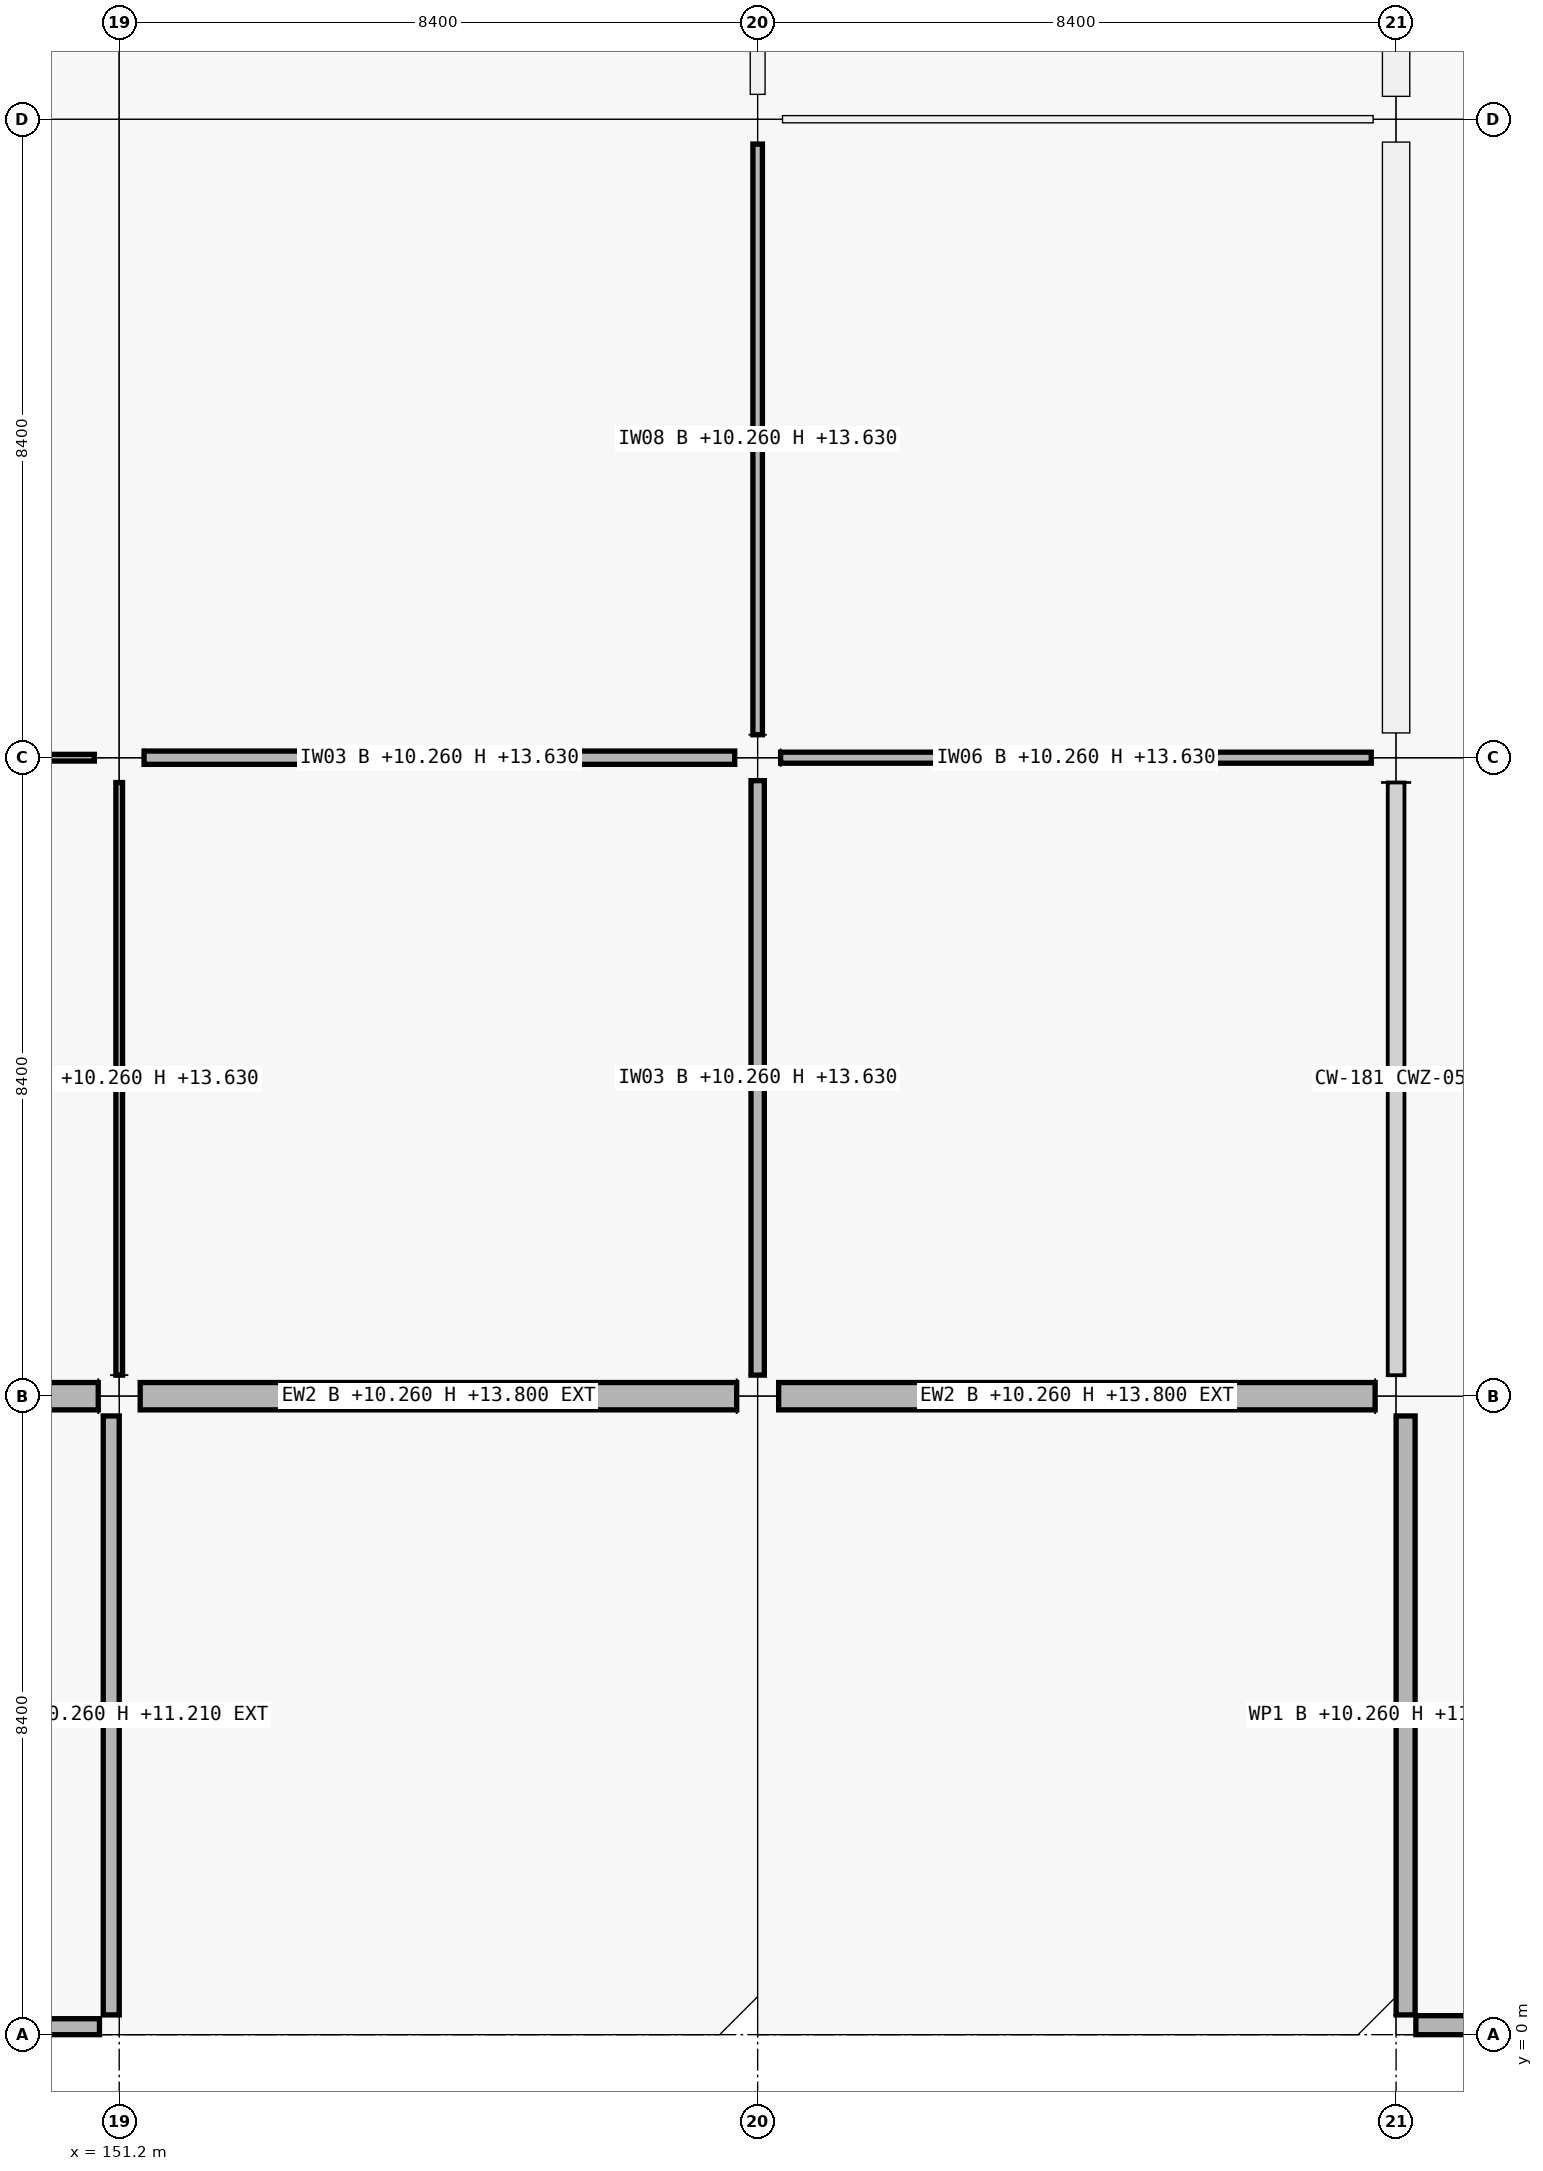
"""IFC4 building model, lengths in metres.
Left out: names, types, materials, properties, quantities, classifications, styles, units other than length and angle.
Written with IfcOpenShell. Run it as: python <this file> out.ifc"""

import sys

from ifc_helpers import new_model, si_unit, direction, frame, frame_2d, origin, origin_2d, place, context, subcontext, project, spatial, rectangle, extrude, element, fill, save


model = new_model("IFC4")
c1 = context("Model", 3, precision=1e-05, world=origin(), true_north=direction((0.0, 1.0)))
c2 = subcontext(c1, "Body", "Model", "MODEL_VIEW")
j1 = project(units=[si_unit("LENGTHUNIT", "METRE"), si_unit("PLANEANGLEUNIT", "RADIAN")], contexts=[c1])
p1 = place(None, origin())
s1 = spatial("IfcSite", under=j1, at=p1, CompositionType="ELEMENT")
p2 = place(p1, origin())
s2 = spatial("IfcBuilding", under=s1, at=p2, CompositionType="ELEMENT")
p3 = place(p2, frame((0.0, 0.0, 10.26)))
s3 = spatial("IfcBuildingStorey", under=s2, at=p3, CompositionType="ELEMENT", Elevation=10.26)
p4 = place(p3, frame((151.2, 8.4, 0.0), z_axis=(0.0, 0.0, 1.0), x_axis=(1.0, 0.0, 0.0)))
e1 = element("IfcColumn", 1, at=p4, inside=s3, PredefinedType="COLUMN", context=c2, shape_type="SweptSolid", body=[
    extrude(rectangle(XDim=0.55, YDim=0.55, at=origin_2d()), origin(), (0.0, 0.0, 1.0), 4.25),
])
p5 = place(p3, frame((151.2, 16.8, 0.0), z_axis=(0.0, 0.0, 1.0), x_axis=(1.0, 0.0, 0.0)))
e2 = element("IfcColumn", 2, at=p5, inside=s3, PredefinedType="COLUMN", context=c2, shape_type="SweptSolid", body=[
    extrude(rectangle(XDim=0.65, YDim=0.65, at=origin_2d()), origin(), (0.0, 0.0, 1.0), 4.5),
])
p6 = place(p3, frame((151.2, 25.2, 0.0), z_axis=(0.0, 0.0, 1.0), x_axis=(1.0, 0.0, 0.0)))
e3 = element("IfcColumn", 3, at=p6, inside=s3, PredefinedType="COLUMN", context=c2, shape_type="SweptSolid", body=[
    extrude(rectangle(XDim=0.6, YDim=0.6, at=origin_2d()), origin(), (0.0, 0.0, 1.0), 4.5),
])
p7 = place(p3, frame((159.6, 8.4, 0.0), z_axis=(0.0, 0.0, 1.0), x_axis=(1.0, 0.0, 0.0)))
e4 = element("IfcColumn", 4, at=p7, inside=s3, PredefinedType="COLUMN", context=c2, shape_type="SweptSolid", body=[
    extrude(rectangle(XDim=0.55, YDim=0.55, at=origin_2d()), origin(), (0.0, 0.0, 1.0), 4.25),
])
p8 = place(p3, frame((159.6, 16.8, 0.0), z_axis=(0.0, 0.0, 1.0), x_axis=(1.0, 0.0, 0.0)))
e5 = element("IfcColumn", 5, at=p8, inside=s3, PredefinedType="COLUMN", context=c2, shape_type="SweptSolid", body=[
    extrude(rectangle(XDim=0.6, YDim=0.6, at=origin_2d()), origin(), (0.0, 0.0, 1.0), 4.5),
])
p9 = place(p3, frame((159.6, 25.2, 0.0), z_axis=(0.0, 0.0, 1.0), x_axis=(1.0, 0.0, 0.0)))
e6 = element("IfcColumn", 6, at=p9, inside=s3, PredefinedType="COLUMN", context=c2, shape_type="SweptSolid", body=[
    extrude(rectangle(XDim=0.65, YDim=0.65, at=origin_2d()), origin(), (0.0, 0.0, 1.0), 4.5),
])
p10 = place(p3, frame((168.0, 8.4, 0.0), z_axis=(0.0, 0.0, 1.0), x_axis=(1.0, 0.0, 0.0)))
e7 = element("IfcColumn", 7, at=p10, inside=s3, PredefinedType="COLUMN", context=c2, shape_type="SweptSolid", body=[
    extrude(rectangle(XDim=0.55, YDim=0.55, at=origin_2d()), origin(), (0.0, 0.0, 1.0), 4.25),
])
p11 = place(p3, frame((168.0, 16.8, 0.0), z_axis=(0.0, 0.0, 1.0), x_axis=(1.0, 0.0, 0.0)))
e8 = element("IfcColumn", 8, at=p11, inside=s3, PredefinedType="COLUMN", context=c2, shape_type="SweptSolid", body=[
    extrude(rectangle(XDim=0.65, YDim=0.65, at=origin_2d()), origin(), (0.0, 0.0, 1.0), 4.5),
])
p12 = place(p3, frame((168.0, 25.2, 0.0), z_axis=(0.0, 0.0, 1.0), x_axis=(1.0, 0.0, 0.0)))
e9 = element("IfcColumn", 9, at=p12, inside=s3, PredefinedType="COLUMN", context=c2, shape_type="SweptSolid", body=[
    extrude(rectangle(XDim=0.6, YDim=0.6, at=origin_2d()), origin(), (0.0, 0.0, 1.0), 4.5),
])
p13 = place(p3, frame((150.924, 8.4, 0.0), z_axis=(0.0, 0.0, 1.0), x_axis=(-1.0, 0.0, 0.0)))
e10 = element("IfcWall", 10, at=p13, inside=s3, PredefinedType="SOLIDWALL", context=c2, shape_type="SweptSolid", body=[
    extrude(rectangle(XDim=7.848, YDim=0.36, at=frame_2d((3.924, 0.0))), origin(), (0.0, 0.0, 1.0), 3.54),
])
p14 = place(p13, frame((2.899, 0.0, 0.9)))
e11 = element("IfcOpeningElement", 11, at=p14, cuts=e10, PredefinedType="OPENING", context=c2, shape_type="SweptSolid", body=[
    extrude(rectangle(XDim=2.05, YDim=1.45, at=frame_2d((1.025, 0.725))), frame((0.0, 0.18, 0.0), z_axis=(0.0, -1.0, 0.0), x_axis=(1.0, 0.0, 0.0)), (0.0, 0.0, 1.0), 0.36),
])
p15 = place(p3, frame((159.324, 8.4, 0.0), z_axis=(0.0, 0.0, 1.0), x_axis=(-1.0, 0.0, 0.0)))
e12 = element("IfcWall", 12, at=p15, inside=s3, PredefinedType="SOLIDWALL", context=c2, shape_type="SweptSolid", body=[
    extrude(rectangle(XDim=7.848, YDim=0.36, at=frame_2d((3.924, 0.0))), origin(), (0.0, 0.0, 1.0), 3.54),
])
p16 = place(p15, frame((2.999, 0.0, 0.0)))
e13 = element("IfcOpeningElement", 13, at=p16, cuts=e12, PredefinedType="OPENING", context=c2, shape_type="SweptSolid", body=[
    extrude(rectangle(XDim=1.85, YDim=2.2, at=frame_2d((0.925, 1.1))), frame((0.0, 0.18, 0.0), z_axis=(0.0, -1.0, 0.0), x_axis=(1.0, 0.0, 0.0)), (0.0, 0.0, 1.0), 0.36),
])
p17 = place(p3, frame((167.724, 8.4, 0.0), z_axis=(0.0, 0.0, 1.0), x_axis=(-1.0, 0.0, 0.0)))
e14 = element("IfcWall", 14, at=p17, inside=s3, PredefinedType="SOLIDWALL", context=c2, shape_type="SweptSolid", body=[
    extrude(rectangle(XDim=7.848, YDim=0.36, at=frame_2d((3.924, 0.0))), origin(), (0.0, 0.0, 1.0), 3.54),
])
p18 = place(p17, frame((3.364, 0.0, 0.0)))
e15 = element("IfcOpeningElement", 15, at=p18, cuts=e14, PredefinedType="OPENING", context=c2, shape_type="SweptSolid", body=[
    extrude(rectangle(XDim=1.12, YDim=2.2, at=frame_2d((0.56, 1.1))), frame((0.0, 0.18, 0.0), z_axis=(0.0, -1.0, 0.0), x_axis=(1.0, 0.0, 0.0)), (0.0, 0.0, 1.0), 0.36),
])
p19 = place(p3, frame((168.0, 24.899, 0.0), z_axis=(0.0, 0.0, 1.0), x_axis=(0.0, -1.0, 0.0)))
e16 = element("IfcWall", 16, at=p19, inside=s3, PredefinedType="SOLIDWALL", context=c2, shape_type="SweptSolid", body=[
    extrude(rectangle(XDim=7.773, YDim=0.36, at=frame_2d((3.886, 0.0))), origin(), (0.0, 0.0, 1.0), 3.54),
])
p20 = place(p19, frame((3.087, 0.0, 0.9)))
e17 = element("IfcOpeningElement", 17, at=p20, cuts=e16, PredefinedType="OPENING", context=c2, shape_type="SweptSolid", body=[
    extrude(rectangle(XDim=1.6, YDim=2.1, at=frame_2d((0.8, 1.05))), frame((0.0, 0.18, 0.0), z_axis=(0.0, -1.0, 0.0), x_axis=(1.0, 0.0, 0.0)), (0.0, 0.0, 1.0), 0.36),
])
p21 = place(p3, frame((168.0, 33.274, 0.0), z_axis=(0.0, 0.0, 1.0), x_axis=(0.0, -1.0, 0.0)))
e18 = element("IfcWall", 18, at=p21, inside=s3, PredefinedType="SOLIDWALL", context=c2, shape_type="SweptSolid", body=[
    extrude(rectangle(XDim=7.773, YDim=0.36, at=frame_2d((3.886, 0.0))), origin(), (0.0, 0.0, 1.0), 3.54),
])
p22 = place(p21, frame((2.886, 0.0, 0.9)))
e19 = element("IfcOpeningElement", 19, at=p22, cuts=e18, PredefinedType="OPENING", context=c2, shape_type="SweptSolid", body=[
    extrude(rectangle(XDim=2.0, YDim=2.1, at=frame_2d((1.0, 1.05))), frame((0.0, 0.18, 0.0), z_axis=(0.0, -1.0, 0.0), x_axis=(1.0, 0.0, 0.0)), (0.0, 0.0, 1.0), 0.36),
])
for number, where, z_axis, x_axis in (
    (20, (150.94, 0.105, 0.0), (0.0, 0.0, 1.0), (-1.0, 0.0, 0.0)),
    (21, (151.095, 8.14, 0.0), (0.0, 0.0, 1.0), (0.0, -1.0, 0.0)),
):
    element("IfcWall", number, at=place(p3, frame(where, z_axis=z_axis, x_axis=x_axis)), inside=s3, PredefinedType="PARAPET", context=c2, shape_type="SweptSolid", body=[
        extrude(rectangle(XDim=7.88, YDim=0.21, at=frame_2d((3.94, 0.0))), origin(), (0.0, 0.0, 1.0), 0.95),
    ])
for number, where, z_axis, x_axis in (
    (22, (176.14, 0.125, 0.0), (0.0, 0.0, 1.0), (-1.0, 0.0, 0.0)),
    (23, (168.125, 0.26, 0.0), (0.0, 0.0, 1.0), (0.0, 1.0, 0.0)),
):
    element("IfcWall", number, at=place(p3, frame(where, z_axis=z_axis, x_axis=x_axis)), inside=s3, PredefinedType="PARAPET", context=c2, shape_type="SweptSolid", body=[
        extrude(rectangle(XDim=7.88, YDim=0.25, at=frame_2d((3.94, 0.0))), origin(), (0.0, 0.0, 1.0), 0.95),
    ])
p23 = place(p3, frame((143.102, 16.8, 0.0), z_axis=(0.0, 0.0, 1.0), x_axis=(1.0, 0.0, 0.0)))
e24 = element("IfcWall", 24, at=p23, inside=s3, PredefinedType="PARTITIONING", context=c2, shape_type="SweptSolid", body=[
    extrude(rectangle(XDim=7.771, YDim=0.088, at=frame_2d((3.885, 0.0))), origin(), (0.0, 0.0, 1.0), 3.37),
])
p24 = place(p23, frame((3.385, 0.0, 0.0)))
e25 = element("IfcOpeningElement", 25, at=p24, cuts=e24, PredefinedType="OPENING", context=c2, shape_type="SweptSolid", body=[
    extrude(rectangle(XDim=1.0, YDim=2.2, at=frame_2d((0.5, 1.1))), frame((0.0, 0.044, 0.0), z_axis=(0.0, -1.0, 0.0), x_axis=(1.0, 0.0, 0.0)), (0.0, 0.0, 1.0), 0.088),
])
p25 = place(p3, frame((151.527, 16.8, 0.0), z_axis=(0.0, 0.0, 1.0), x_axis=(1.0, 0.0, 0.0)))
e26 = element("IfcWall", 26, at=p25, inside=s3, PredefinedType="PARTITIONING", context=c2, shape_type="SweptSolid", body=[
    extrude(rectangle(XDim=7.771, YDim=0.175, at=frame_2d((3.885, 0.0))), origin(), (0.0, 0.0, 1.0), 3.37),
])
p26 = place(p25, frame((3.396, 0.0, 0.0)))
e27 = element("IfcOpeningElement", 27, at=p26, cuts=e26, PredefinedType="OPENING", context=c2, shape_type="SweptSolid", body=[
    extrude(rectangle(XDim=0.98, YDim=2.18, at=frame_2d((0.49, 1.09))), frame((0.0, 0.087, 0.0), z_axis=(0.0, -1.0, 0.0), x_axis=(1.0, 0.0, 0.0)), (0.0, 0.0, 1.0), 0.175),
])
p27 = place(p3, frame((159.902, 16.8, 0.0), z_axis=(0.0, 0.0, 1.0), x_axis=(1.0, 0.0, 0.0)))
e28 = element("IfcWall", 28, at=p27, inside=s3, PredefinedType="PARTITIONING", context=c2, shape_type="SweptSolid", body=[
    extrude(rectangle(XDim=7.771, YDim=0.145, at=frame_2d((3.885, 0.0))), origin(), (0.0, 0.0, 1.0), 3.37),
])
p28 = place(p27, frame((3.425, 0.0, 0.0)))
e29 = element("IfcOpeningElement", 29, at=p28, cuts=e28, PredefinedType="OPENING", context=c2, shape_type="SweptSolid", body=[
    extrude(rectangle(XDim=0.92, YDim=2.15, at=frame_2d((0.46, 1.075))), frame((0.0, 0.073, 0.0), z_axis=(0.0, -1.0, 0.0), x_axis=(1.0, 0.0, 0.0)), (0.0, 0.0, 1.0), 0.145),
])
p29 = place(p3, frame((159.927, 25.2, 0.0), z_axis=(0.0, 0.0, 1.0), x_axis=(1.0, 0.0, 0.0)))
e30 = element("IfcWall", 30, at=p29, inside=s3, PredefinedType="PARTITIONING", context=c2, shape_type="SweptSolid", body=[
    extrude(rectangle(XDim=7.771, YDim=0.095, at=frame_2d((3.885, 0.0))), origin(), (0.0, 0.0, 1.0), 3.37),
])
p30 = place(p29, frame((3.401, 0.0, 0.0)))
e31 = element("IfcOpeningElement", 31, at=p30, cuts=e30, PredefinedType="OPENING", context=c2, shape_type="SweptSolid", body=[
    extrude(rectangle(XDim=0.97, YDim=2.12, at=frame_2d((0.485, 1.06))), frame((0.0, 0.047, 0.0), z_axis=(0.0, -1.0, 0.0), x_axis=(1.0, 0.0, 0.0)), (0.0, 0.0, 1.0), 0.095),
])
p31 = place(p3, frame((151.2, 8.677, 0.0), z_axis=(0.0, 0.0, 1.0), x_axis=(0.0, 1.0, 0.0)))
e32 = element("IfcWall", 32, at=p31, inside=s3, PredefinedType="PARTITIONING", context=c2, shape_type="SweptSolid", body=[
    extrude(rectangle(XDim=7.796, YDim=0.088, at=frame_2d((3.898, 0.0))), origin(), (0.0, 0.0, 1.0), 3.37),
])
p32 = place(p31, frame((3.393, 0.0, 0.0)))
e33 = element("IfcOpeningElement", 33, at=p32, cuts=e32, PredefinedType="OPENING", context=c2, shape_type="SweptSolid", body=[
    extrude(rectangle(XDim=1.01, YDim=2.12, at=frame_2d((0.505, 1.06))), frame((0.0, 0.044, 0.0), z_axis=(0.0, -1.0, 0.0), x_axis=(1.0, 0.0, 0.0)), (0.0, 0.0, 1.0), 0.088),
])
p33 = place(p3, frame((159.6, 8.677, 0.0), z_axis=(0.0, 0.0, 1.0), x_axis=(0.0, 1.0, 0.0)))
e34 = element("IfcWall", 34, at=p33, inside=s3, PredefinedType="PARTITIONING", context=c2, shape_type="SweptSolid", body=[
    extrude(rectangle(XDim=7.821, YDim=0.175, at=frame_2d((3.911, 0.0))), origin(), (0.0, 0.0, 1.0), 3.37),
])
p34 = place(p33, frame((3.37, 0.0, 0.0)))
e35 = element("IfcOpeningElement", 35, at=p34, cuts=e34, PredefinedType="OPENING", context=c2, shape_type="SweptSolid", body=[
    extrude(rectangle(XDim=1.08, YDim=2.25, at=frame_2d((0.54, 1.125))), frame((0.0, 0.087, 0.0), z_axis=(0.0, -1.0, 0.0), x_axis=(1.0, 0.0, 0.0)), (0.0, 0.0, 1.0), 0.175),
])
p35 = place(p3, frame((159.6, 17.102, 0.0), z_axis=(0.0, 0.0, 1.0), x_axis=(0.0, 1.0, 0.0)))
e36 = element("IfcWall", 36, at=p35, inside=s3, PredefinedType="PARTITIONING", context=c2, shape_type="SweptSolid", body=[
    extrude(rectangle(XDim=7.771, YDim=0.125, at=frame_2d((3.885, 0.0))), origin(), (0.0, 0.0, 1.0), 3.37),
])
p36 = place(p35, frame((3.356, 0.0, 0.0)))
e37 = element("IfcOpeningElement", 37, at=p36, cuts=e36, PredefinedType="OPENING", context=c2, shape_type="SweptSolid", body=[
    extrude(rectangle(XDim=1.06, YDim=2.25, at=frame_2d((0.53, 1.125))), frame((0.0, 0.062, 0.0), z_axis=(0.0, -1.0, 0.0), x_axis=(1.0, 0.0, 0.0)), (0.0, 0.0, 1.0), 0.125),
])
p37 = place(p3, frame((159.6, 25.527, 0.0), z_axis=(0.0, 0.0, 1.0), x_axis=(0.0, 1.0, 0.0)))
e38 = element("IfcWall", 38, at=p37, inside=s3, PredefinedType="PARTITIONING", context=c2, shape_type="SweptSolid", body=[
    extrude(rectangle(XDim=7.771, YDim=0.195, at=frame_2d((3.885, 0.0))), origin(), (0.0, 0.0, 1.0), 3.37),
])
p38 = place(p37, frame((3.361, 0.0, 0.0)))
e39 = element("IfcOpeningElement", 39, at=p38, cuts=e38, PredefinedType="OPENING", context=c2, shape_type="SweptSolid", body=[
    extrude(rectangle(XDim=1.05, YDim=2.12, at=frame_2d((0.525, 1.06))), frame((0.0, 0.098, 0.0), z_axis=(0.0, -1.0, 0.0), x_axis=(1.0, 0.0, 0.0)), (0.0, 0.0, 1.0), 0.195),
])
p39 = place(p16, origin())
e40 = element("IfcDoor", 40, at=p39, inside=s3, OperationType="DOUBLE_DOOR_SINGLE_SWING", PredefinedType="DOOR", context=c2, shape_type="SweptSolid", body=[
    extrude(rectangle(XDim=1.85, YDim=2.2, at=frame_2d((0.925, 1.1))), frame((0.0, 0.025, 0.0), z_axis=(0.0, -1.0, 0.0), x_axis=(1.0, 0.0, 0.0)), (0.0, 0.0, 1.0), 0.05),
])
fill(e13, e40)
p40 = place(p18, origin())
e41 = element("IfcDoor", 41, at=p40, inside=s3, OperationType="SINGLE_SWING_LEFT", PredefinedType="DOOR", context=c2, shape_type="SweptSolid", body=[
    extrude(rectangle(XDim=1.12, YDim=2.2, at=frame_2d((0.56, 1.1))), frame((0.0, 0.025, 0.0), z_axis=(0.0, -1.0, 0.0), x_axis=(1.0, 0.0, 0.0)), (0.0, 0.0, 1.0), 0.05),
])
fill(e15, e41)
p41 = place(p20, origin())
e42 = element("IfcWindow", 42, at=p41, inside=s3, PartitioningType="SINGLE_PANEL", PredefinedType="WINDOW", context=c2, shape_type="SweptSolid", body=[
    extrude(rectangle(XDim=1.6, YDim=2.1, at=frame_2d((0.8, 1.05))), frame((0.0, 0.03, 0.0), z_axis=(0.0, -1.0, 0.0), x_axis=(1.0, 0.0, 0.0)), (0.0, 0.0, 1.0), 0.06),
])
fill(e17, e42)
p42 = place(p30, origin())
e43 = element("IfcDoor", 43, at=p42, inside=s3, OperationType="SINGLE_SWING_RIGHT", PredefinedType="DOOR", context=c2, shape_type="SweptSolid", body=[
    extrude(rectangle(XDim=0.97, YDim=2.12, at=frame_2d((0.485, 1.06))), frame((0.0, 0.025, 0.0), z_axis=(0.0, -1.0, 0.0), x_axis=(1.0, 0.0, 0.0)), (0.0, 0.0, 1.0), 0.05),
])
fill(e31, e43)
p43 = place(p26, origin())
e44 = element("IfcDoor", 44, at=p43, inside=s3, OperationType="SINGLE_SWING_LEFT", PredefinedType="DOOR", context=c2, shape_type="SweptSolid", body=[
    extrude(rectangle(XDim=0.98, YDim=2.18, at=frame_2d((0.49, 1.09))), frame((0.0, 0.025, 0.0), z_axis=(0.0, -1.0, 0.0), x_axis=(1.0, 0.0, 0.0)), (0.0, 0.0, 1.0), 0.05),
])
fill(e27, e44)
p44 = place(p28, origin())
e45 = element("IfcDoor", 45, at=p44, inside=s3, OperationType="SINGLE_SWING_RIGHT", PredefinedType="DOOR", context=c2, shape_type="SweptSolid", body=[
    extrude(rectangle(XDim=0.92, YDim=2.15, at=frame_2d((0.46, 1.075))), frame((0.0, 0.025, 0.0), z_axis=(0.0, -1.0, 0.0), x_axis=(1.0, 0.0, 0.0)), (0.0, 0.0, 1.0), 0.05),
])
fill(e29, e45)
p45 = place(p36, origin())
e46 = element("IfcDoor", 46, at=p45, inside=s3, OperationType="SINGLE_SWING_RIGHT", PredefinedType="DOOR", context=c2, shape_type="SweptSolid", body=[
    extrude(rectangle(XDim=1.06, YDim=2.25, at=frame_2d((0.53, 1.125))), frame((0.0, 0.025, 0.0), z_axis=(0.0, -1.0, 0.0), x_axis=(1.0, 0.0, 0.0)), (0.0, 0.0, 1.0), 0.05),
])
fill(e37, e46)
p46 = place(p32, origin())
e47 = element("IfcDoor", 47, at=p46, inside=s3, OperationType="SINGLE_SWING_RIGHT", PredefinedType="DOOR", context=c2, shape_type="SweptSolid", body=[
    extrude(rectangle(XDim=1.01, YDim=2.12, at=frame_2d((0.505, 1.06))), frame((0.0, 0.025, 0.0), z_axis=(0.0, -1.0, 0.0), x_axis=(1.0, 0.0, 0.0)), (0.0, 0.0, 1.0), 0.05),
])
fill(e33, e47)
p47 = place(p34, origin())
e48 = element("IfcDoor", 48, at=p47, inside=s3, OperationType="SINGLE_SWING_LEFT", PredefinedType="DOOR", context=c2, shape_type="SweptSolid", body=[
    extrude(rectangle(XDim=1.08, YDim=2.25, at=frame_2d((0.54, 1.125))), frame((0.0, 0.025, 0.0), z_axis=(0.0, -1.0, 0.0), x_axis=(1.0, 0.0, 0.0)), (0.0, 0.0, 1.0), 0.05),
])
fill(e35, e48)
save(model, sys.argv[1])
